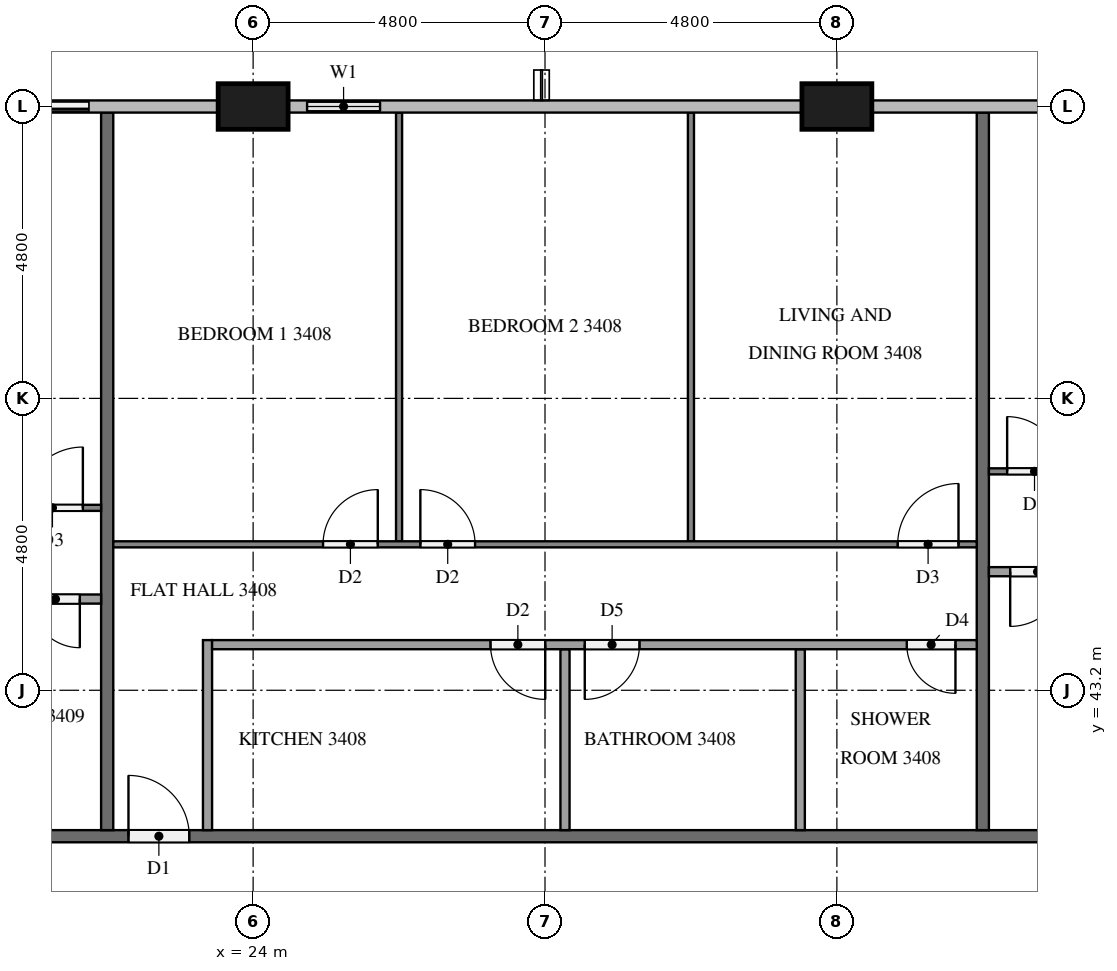
"""IFC4 building model, lengths in metres.
Left out: names, types, materials, properties, quantities, classifications, styles, units other than length and angle.
Written with IfcOpenShell. Run it as: python <this file> out.ifc"""

import sys

from ifc_helpers import new_model, si_unit, direction, frame, frame_2d, origin, origin_2d, place, context, subcontext, project, spatial, rectangle, extrude, element, fill, save


model = new_model("IFC4")
c1 = context("Model", 3, precision=1e-05, world=origin(), true_north=direction((0.0, 1.0)))
c2 = subcontext(c1, "Body", "Model", "MODEL_VIEW")
j1 = project(units=[si_unit("LENGTHUNIT", "METRE"), si_unit("PLANEANGLEUNIT", "RADIAN")], contexts=[c1])
p1 = place(None, origin())
s1 = spatial("IfcSite", under=j1, at=p1, CompositionType="ELEMENT")
p2 = place(p1, origin())
s2 = spatial("IfcBuilding", under=s1, at=p2, CompositionType="ELEMENT")
p3 = place(p2, frame((0.0, 0.0, 133.1)))
s3 = spatial("IfcBuildingStorey", under=s2, at=p3, CompositionType="ELEMENT", Elevation=133.1)
for number, where, z_axis, x_axis in (
    (1, (33.6, 52.8, 0.0), (0.0, 0.0, 1.0), (1.0, 0.0, 0.0)),
    (2, (24.0, 52.8, 0.0), (0.0, 0.0, 1.0), (1.0, 0.0, 0.0)),
):
    element("IfcColumn", number, at=place(p3, frame(where, z_axis=z_axis, x_axis=x_axis)), inside=s3, PredefinedType="COLUMN", context=c2, shape_type="SweptSolid", body=[
        extrude(rectangle(XDim=1.15, YDim=0.75, at=origin_2d()), origin(), (0.0, 0.0, 1.0), 3.2),
    ])
p4 = place(p3, frame((26.4, 52.8, 0.0), z_axis=(0.0, 0.0, 1.0), x_axis=(-1.0, 0.0, 0.0)))
e3 = element("IfcWall", 3, at=p4, inside=s3, PredefinedType="SOLIDWALL", context=c2, shape_type="SweptSolid", body=[
    extrude(rectangle(XDim=1.825, YDim=0.15, at=frame_2d((0.913, 0.0))), origin(), (0.0, 0.0, 1.0), 3.2),
])
p5 = place(p4, frame((0.312, 0.0, 0.9)))
e4 = element("IfcOpeningElement", 4, at=p5, cuts=e3, PredefinedType="OPENING", context=c2, shape_type="SweptSolid", body=[
    extrude(rectangle(XDim=1.2, YDim=1.4, at=frame_2d((0.6, 0.7))), frame((0.0, 0.085, 0.0), z_axis=(0.0, -1.0, 0.0), x_axis=(1.0, 0.0, 0.0)), (0.0, 0.0, 1.0), 0.17),
])
p6 = place(p3, frame((21.6, 52.8, 0.0), z_axis=(0.0, 0.0, 1.0), x_axis=(-1.0, 0.0, 0.0)))
e5 = element("IfcWall", 5, at=p6, inside=s3, PredefinedType="SOLIDWALL", context=c2, shape_type="SweptSolid", body=[
    extrude(rectangle(XDim=2.4, YDim=0.15, at=frame_2d((1.2, 0.0))), origin(), (0.0, 0.0, 1.0), 3.2),
])
p7 = place(p6, frame((0.3, 0.0, 0.0)))
e6 = element("IfcOpeningElement", 6, at=p7, cuts=e5, PredefinedType="OPENING", context=c2, shape_type="SweptSolid", body=[
    extrude(rectangle(XDim=1.8, YDim=2.4, at=frame_2d((0.9, 1.2))), frame((0.0, 0.085, 0.0), z_axis=(0.0, -1.0, 0.0), x_axis=(1.0, 0.0, 0.0)), (0.0, 0.0, 1.0), 0.17),
])
p8 = place(p3, frame((11.9, 40.8, 0.0), z_axis=(0.0, 0.0, 1.0), x_axis=(1.0, 0.0, 0.0)))
e7 = element("IfcWall", 7, at=p8, inside=s3, PredefinedType="PARTITIONING", context=c2, shape_type="SweptSolid", body=[
    extrude(rectangle(XDim=38.6, YDim=0.2, at=frame_2d((19.3, 0.0))), origin(), (0.0, 0.0, 1.0), 3.2),
])
p9 = place(p8, frame((37.15, 0.0, 0.0)))
e8 = element("IfcOpeningElement", 8, at=p9, cuts=e7, PredefinedType="OPENING", context=c2, shape_type="SweptSolid", body=[
    extrude(rectangle(XDim=1.0, YDim=2.1, at=frame_2d((0.5, 1.05))), frame((0.0, 0.11, 0.0), z_axis=(0.0, -1.0, 0.0), x_axis=(1.0, 0.0, 0.0)), (0.0, 0.0, 1.0), 0.22),
])
p10 = place(p8, frame((10.05, 0.0, 0.0)))
e9 = element("IfcOpeningElement", 9, at=p10, cuts=e7, PredefinedType="OPENING", context=c2, shape_type="SweptSolid", body=[
    extrude(rectangle(XDim=1.0, YDim=2.1, at=frame_2d((0.5, 1.05))), frame((0.0, 0.11, 0.0), z_axis=(0.0, -1.0, 0.0), x_axis=(1.0, 0.0, 0.0)), (0.0, 0.0, 1.0), 0.22),
])
p11 = place(p8, frame((0.45, 0.0, 0.0)))
e10 = element("IfcOpeningElement", 10, at=p11, cuts=e7, PredefinedType="OPENING", context=c2, shape_type="SweptSolid", body=[
    extrude(rectangle(XDim=1.0, YDim=2.1, at=frame_2d((0.5, 1.05))), frame((0.0, 0.11, 0.0), z_axis=(0.0, -1.0, 0.0), x_axis=(1.0, 0.0, 0.0)), (0.0, 0.0, 1.0), 0.22),
])
for number, where, z_axis, x_axis in (
    (11, (36.0, 52.7, 0.0), (0.0, 0.0, 1.0), (0.0, -1.0, 0.0)),
    (12, (21.6, 52.7, 0.0), (0.0, 0.0, 1.0), (0.0, -1.0, 0.0)),
):
    element("IfcWall", number, at=place(p3, frame(where, z_axis=z_axis, x_axis=x_axis)), inside=s3, PredefinedType="PARTITIONING", context=c2, shape_type="SweptSolid", body=[
        extrude(rectangle(XDim=11.8, YDim=0.2, at=frame_2d((5.9, 0.0))), origin(), (0.0, 0.0, 1.0), 3.2),
    ])
p12 = place(p3, frame((36.1, 46.8, 0.0), z_axis=(0.0, 0.0, 1.0), x_axis=(1.0, 0.0, 0.0)))
e13 = element("IfcWall", 13, at=p12, inside=s3, PredefinedType="PARTITIONING", context=c2, shape_type="SweptSolid", body=[
    extrude(rectangle(XDim=14.2, YDim=0.1, at=frame_2d((7.1, 0.0))), origin(), (0.0, 0.0, 1.0), 3.2),
])
p13 = place(p12, frame((9.85, 0.0, 0.0)))
e14 = element("IfcOpeningElement", 14, at=p13, cuts=e13, PredefinedType="OPENING", context=c2, shape_type="SweptSolid", body=[
    extrude(rectangle(XDim=0.9, YDim=2.1, at=frame_2d((0.45, 1.05))), frame((0.0, 0.06, 0.0), z_axis=(0.0, -1.0, 0.0), x_axis=(1.0, 0.0, 0.0)), (0.0, 0.0, 1.0), 0.12),
])
p14 = place(p12, frame((8.15, 0.0, 0.0)))
e15 = element("IfcOpeningElement", 15, at=p14, cuts=e13, PredefinedType="OPENING", context=c2, shape_type="SweptSolid", body=[
    extrude(rectangle(XDim=1.0, YDim=2.1, at=frame_2d((0.5, 1.05))), frame((0.0, 0.06, 0.0), z_axis=(0.0, -1.0, 0.0), x_axis=(1.0, 0.0, 0.0)), (0.0, 0.0, 1.0), 0.12),
])
p15 = place(p12, frame((0.3, 0.0, 0.0)))
e16 = element("IfcOpeningElement", 16, at=p15, cuts=e13, PredefinedType="OPENING", context=c2, shape_type="SweptSolid", body=[
    extrude(rectangle(XDim=0.9, YDim=2.1, at=frame_2d((0.45, 1.05))), frame((0.0, 0.06, 0.0), z_axis=(0.0, -1.0, 0.0), x_axis=(1.0, 0.0, 0.0)), (0.0, 0.0, 1.0), 0.12),
])
p16 = place(p3, frame((48.675, 45.15, 0.0), z_axis=(0.0, 0.0, 1.0), x_axis=(-1.0, 0.0, 0.0)))
e17 = element("IfcWall", 17, at=p16, inside=s3, PredefinedType="PARTITIONING", context=c2, shape_type="SweptSolid", body=[
    extrude(rectangle(XDim=12.575, YDim=0.15, at=frame_2d((6.288, 0.0))), origin(), (0.0, 0.0, 1.0), 3.2),
])
p17 = place(p16, frame((2.644, 0.0, 0.0)))
e18 = element("IfcOpeningElement", 18, at=p17, cuts=e17, PredefinedType="OPENING", context=c2, shape_type="SweptSolid", body=[
    extrude(rectangle(XDim=0.9, YDim=2.1, at=frame_2d((0.45, 1.05))), frame((0.0, 0.085, 0.0), z_axis=(0.0, -1.0, 0.0), x_axis=(1.0, 0.0, 0.0)), (0.0, 0.0, 1.0), 0.17),
])
p18 = place(p16, frame((4.194, 0.0, 0.0)))
e19 = element("IfcOpeningElement", 19, at=p18, cuts=e17, PredefinedType="OPENING", context=c2, shape_type="SweptSolid", body=[
    extrude(rectangle(XDim=0.8, YDim=2.1, at=frame_2d((0.4, 1.05))), frame((0.0, 0.085, 0.0), z_axis=(0.0, -1.0, 0.0), x_axis=(1.0, 0.0, 0.0)), (0.0, 0.0, 1.0), 0.17),
])
p19 = place(p16, frame((11.325, 0.0, 0.0)))
e20 = element("IfcOpeningElement", 20, at=p19, cuts=e17, PredefinedType="OPENING", context=c2, shape_type="SweptSolid", body=[
    extrude(rectangle(XDim=0.9, YDim=2.1, at=frame_2d((0.45, 1.05))), frame((0.0, 0.085, 0.0), z_axis=(0.0, -1.0, 0.0), x_axis=(1.0, 0.0, 0.0)), (0.0, 0.0, 1.0), 0.17),
])
for number, where, z_axis, x_axis in (
    (21, (26.4, 45.65, 0.0), (0.0, 0.0, 1.0), (0.0, 1.0, 0.0)),
    (22, (31.2, 45.65, 0.0), (0.0, 0.0, 1.0), (0.0, 1.0, 0.0)),
):
    element("IfcWall", number, at=place(p3, frame(where, z_axis=z_axis, x_axis=x_axis)), inside=s3, PredefinedType="PARTITIONING", context=c2, shape_type="SweptSolid", body=[
        extrude(rectangle(XDim=7.05, YDim=0.1, at=frame_2d((3.525, 0.0))), origin(), (0.0, 0.0, 1.0), 3.2),
    ])
p20 = place(p3, frame((21.7, 45.6, 0.0), z_axis=(0.0, 0.0, 1.0), x_axis=(1.0, 0.0, 0.0)))
e23 = element("IfcWall", 23, at=p20, inside=s3, PredefinedType="PARTITIONING", context=c2, shape_type="SweptSolid", body=[
    extrude(rectangle(XDim=14.2, YDim=0.1, at=frame_2d((7.1, 0.0))), origin(), (0.0, 0.0, 1.0), 3.2),
])
p21 = place(p20, frame((3.45, 0.0, 0.0)))
e24 = element("IfcOpeningElement", 24, at=p21, cuts=e23, PredefinedType="OPENING", context=c2, shape_type="SweptSolid", body=[
    extrude(rectangle(XDim=0.9, YDim=2.1, at=frame_2d((0.45, 1.05))), frame((0.0, 0.06, 0.0), z_axis=(0.0, -1.0, 0.0), x_axis=(1.0, 0.0, 0.0)), (0.0, 0.0, 1.0), 0.12),
])
p22 = place(p20, frame((5.05, 0.0, 0.0)))
e25 = element("IfcOpeningElement", 25, at=p22, cuts=e23, PredefinedType="OPENING", context=c2, shape_type="SweptSolid", body=[
    extrude(rectangle(XDim=0.9, YDim=2.1, at=frame_2d((0.45, 1.05))), frame((0.0, 0.06, 0.0), z_axis=(0.0, -1.0, 0.0), x_axis=(1.0, 0.0, 0.0)), (0.0, 0.0, 1.0), 0.12),
])
p23 = place(p20, frame((12.9, 0.0, 0.0)))
e26 = element("IfcOpeningElement", 26, at=p23, cuts=e23, PredefinedType="OPENING", context=c2, shape_type="SweptSolid", body=[
    extrude(rectangle(XDim=1.0, YDim=2.1, at=frame_2d((0.5, 1.05))), frame((0.0, 0.06, 0.0), z_axis=(0.0, -1.0, 0.0), x_axis=(1.0, 0.0, 0.0)), (0.0, 0.0, 1.0), 0.12),
])
for number, where, z_axis, x_axis in (
    (27, (29.129, 40.9, 0.0), (0.0, 0.0, 1.0), (0.0, 1.0, 0.0)),
    (28, (32.998, 40.9, 0.0), (0.0, 0.0, 1.0), (0.0, 1.0, 0.0)),
):
    element("IfcWall", number, at=place(p3, frame(where, z_axis=z_axis, x_axis=x_axis)), inside=s3, PredefinedType="PARTITIONING", context=c2, shape_type="SweptSolid", body=[
        extrude(rectangle(XDim=2.975, YDim=0.15, at=frame_2d((1.488, 0.0))), origin(), (0.0, 0.0, 1.0), 3.2),
    ])
p24 = place(p3, frame((23.25, 40.9, 0.0), z_axis=(0.0, 0.0, 1.0), x_axis=(0.0, 1.0, 0.0)))
e29 = element("IfcWall", 29, at=p24, inside=s3, PredefinedType="PARTITIONING", context=c2, shape_type="SweptSolid", body=[
    extrude(rectangle(XDim=3.125, YDim=0.15, at=frame_2d((1.562, 0.0))), origin(), (0.0, 0.0, 1.0), 3.2),
])
p25 = place(p3, frame((35.9, 43.95, 0.0), z_axis=(0.0, 0.0, 1.0), x_axis=(-1.0, 0.0, 0.0)))
e30 = element("IfcWall", 30, at=p25, inside=s3, PredefinedType="PARTITIONING", context=c2, shape_type="SweptSolid", body=[
    extrude(rectangle(XDim=12.575, YDim=0.15, at=frame_2d((6.288, 0.0))), origin(), (0.0, 0.0, 1.0), 3.2),
])
p26 = place(p25, frame((7.096, 0.0, 0.0)))
e31 = element("IfcOpeningElement", 31, at=p26, cuts=e30, PredefinedType="OPENING", context=c2, shape_type="SweptSolid", body=[
    extrude(rectangle(XDim=0.9, YDim=2.1, at=frame_2d((0.45, 1.05))), frame((0.0, 0.085, 0.0), z_axis=(0.0, -1.0, 0.0), x_axis=(1.0, 0.0, 0.0)), (0.0, 0.0, 1.0), 0.17),
])
p27 = place(p25, frame((5.546, 0.0, 0.0)))
e32 = element("IfcOpeningElement", 32, at=p27, cuts=e30, PredefinedType="OPENING", context=c2, shape_type="SweptSolid", body=[
    extrude(rectangle(XDim=0.9, YDim=2.1, at=frame_2d((0.45, 1.05))), frame((0.0, 0.085, 0.0), z_axis=(0.0, -1.0, 0.0), x_axis=(1.0, 0.0, 0.0)), (0.0, 0.0, 1.0), 0.17),
])
p28 = place(p25, frame((0.35, 0.0, 0.0)))
e33 = element("IfcOpeningElement", 33, at=p28, cuts=e30, PredefinedType="OPENING", context=c2, shape_type="SweptSolid", body=[
    extrude(rectangle(XDim=0.8, YDim=2.1, at=frame_2d((0.4, 1.05))), frame((0.0, 0.085, 0.0), z_axis=(0.0, -1.0, 0.0), x_axis=(1.0, 0.0, 0.0)), (0.0, 0.0, 1.0), 0.17),
])
p29 = place(p3, frame((12.1, 46.2, 0.0), z_axis=(0.0, 0.0, 1.0), x_axis=(1.0, 0.0, 0.0)))
e34 = element("IfcWall", 34, at=p29, inside=s3, PredefinedType="PARTITIONING", context=c2, shape_type="SweptSolid", body=[
    extrude(rectangle(XDim=9.4, YDim=0.1, at=frame_2d((4.7, 0.0))), origin(), (0.0, 0.0, 1.0), 3.2),
])
p30 = place(p29, frame((0.3, 0.0, 0.0)))
e35 = element("IfcOpeningElement", 35, at=p30, cuts=e34, PredefinedType="OPENING", context=c2, shape_type="SweptSolid", body=[
    extrude(rectangle(XDim=0.9, YDim=2.1, at=frame_2d((0.45, 1.05))), frame((0.0, 0.06, 0.0), z_axis=(0.0, -1.0, 0.0), x_axis=(1.0, 0.0, 0.0)), (0.0, 0.0, 1.0), 0.12),
])
p31 = place(p29, frame((8.1, 0.0, 0.0)))
e36 = element("IfcOpeningElement", 36, at=p31, cuts=e34, PredefinedType="OPENING", context=c2, shape_type="SweptSolid", body=[
    extrude(rectangle(XDim=1.0, YDim=2.1, at=frame_2d((0.5, 1.05))), frame((0.0, 0.06, 0.0), z_axis=(0.0, -1.0, 0.0), x_axis=(1.0, 0.0, 0.0)), (0.0, 0.0, 1.0), 0.12),
])
p32 = place(p3, frame((21.5, 44.7, 0.0), z_axis=(0.0, 0.0, 1.0), x_axis=(-1.0, 0.0, 0.0)))
e37 = element("IfcWall", 37, at=p32, inside=s3, PredefinedType="PARTITIONING", context=c2, shape_type="SweptSolid", body=[
    extrude(rectangle(XDim=7.775, YDim=0.15, at=frame_2d((3.887, 0.0))), origin(), (0.0, 0.0, 1.0), 3.2),
])
p33 = place(p32, frame((6.575, 0.0, 0.0)))
e38 = element("IfcOpeningElement", 38, at=p33, cuts=e37, PredefinedType="OPENING", context=c2, shape_type="SweptSolid", body=[
    extrude(rectangle(XDim=0.9, YDim=2.1, at=frame_2d((0.45, 1.05))), frame((0.0, 0.085, 0.0), z_axis=(0.0, -1.0, 0.0), x_axis=(1.0, 0.0, 0.0)), (0.0, 0.0, 1.0), 0.17),
])
p34 = place(p32, frame((0.35, 0.0, 0.0)))
e39 = element("IfcOpeningElement", 39, at=p34, cuts=e37, PredefinedType="OPENING", context=c2, shape_type="SweptSolid", body=[
    extrude(rectangle(XDim=0.8, YDim=2.1, at=frame_2d((0.4, 1.05))), frame((0.0, 0.085, 0.0), z_axis=(0.0, -1.0, 0.0), x_axis=(1.0, 0.0, 0.0)), (0.0, 0.0, 1.0), 0.17),
])
p35 = place(p5, origin())
e40 = element("IfcWindow", 40, at=p35, inside=s3, PartitioningType="SINGLE_PANEL", PredefinedType="WINDOW", context=c2, shape_type="SweptSolid", body=[
    extrude(rectangle(XDim=1.2, YDim=1.4, at=frame_2d((0.6, 0.7))), frame((0.0, 0.03, 0.0), z_axis=(0.0, -1.0, 0.0), x_axis=(1.0, 0.0, 0.0)), (0.0, 0.0, 1.0), 0.06),
])
fill(e4, e40)
p36 = place(p7, origin())
e41 = element("IfcDoor", 41, at=p36, inside=s3, OperationType="SLIDING_TO_RIGHT", PredefinedType="DOOR", context=c2, shape_type="SweptSolid", body=[
    extrude(rectangle(XDim=1.8, YDim=2.4, at=frame_2d((0.9, 1.2))), frame((0.0, 0.025, 0.0), z_axis=(0.0, -1.0, 0.0), x_axis=(1.0, 0.0, 0.0)), (0.0, 0.0, 1.0), 0.05),
])
fill(e6, e41)
p37 = place(p10, origin())
e42 = element("IfcDoor", 42, at=p37, inside=s3, OperationType="SINGLE_SWING_LEFT", PredefinedType="DOOR", context=c2, shape_type="SweptSolid", body=[
    extrude(rectangle(XDim=1.0, YDim=2.1, at=frame_2d((0.5, 1.05))), frame((0.0, 0.025, 0.0), z_axis=(0.0, -1.0, 0.0), x_axis=(1.0, 0.0, 0.0)), (0.0, 0.0, 1.0), 0.05),
])
fill(e9, e42)
p38 = place(p15, origin())
e43 = element("IfcDoor", 43, at=p38, inside=s3, OperationType="SINGLE_SWING_LEFT", PredefinedType="DOOR", context=c2, shape_type="SweptSolid", body=[
    extrude(rectangle(XDim=0.9, YDim=2.1, at=frame_2d((0.45, 1.05))), frame((0.0, 0.025, 0.0), z_axis=(0.0, -1.0, 0.0), x_axis=(1.0, 0.0, 0.0)), (0.0, 0.0, 1.0), 0.05),
])
fill(e16, e43)
p39 = place(p19, origin())
e44 = element("IfcDoor", 44, at=p39, inside=s3, OperationType="SINGLE_SWING_RIGHT", PredefinedType="DOOR", context=c2, shape_type="SweptSolid", body=[
    extrude(rectangle(XDim=0.9, YDim=2.1, at=frame_2d((0.45, 1.05))), frame((0.0, 0.025, 0.0), z_axis=(0.0, -1.0, 0.0), x_axis=(1.0, 0.0, 0.0)), (0.0, 0.0, 1.0), 0.05),
])
fill(e20, e44)
p40 = place(p21, origin())
e45 = element("IfcDoor", 45, at=p40, inside=s3, OperationType="SINGLE_SWING_RIGHT", PredefinedType="DOOR", context=c2, shape_type="SweptSolid", body=[
    extrude(rectangle(XDim=0.9, YDim=2.1, at=frame_2d((0.45, 1.05))), frame((0.0, 0.025, 0.0), z_axis=(0.0, -1.0, 0.0), x_axis=(1.0, 0.0, 0.0)), (0.0, 0.0, 1.0), 0.05),
])
fill(e24, e45)
p41 = place(p22, origin())
e46 = element("IfcDoor", 46, at=p41, inside=s3, OperationType="SINGLE_SWING_LEFT", PredefinedType="DOOR", context=c2, shape_type="SweptSolid", body=[
    extrude(rectangle(XDim=0.9, YDim=2.1, at=frame_2d((0.45, 1.05))), frame((0.0, 0.025, 0.0), z_axis=(0.0, -1.0, 0.0), x_axis=(1.0, 0.0, 0.0)), (0.0, 0.0, 1.0), 0.05),
])
fill(e25, e46)
p42 = place(p23, origin())
e47 = element("IfcDoor", 47, at=p42, inside=s3, OperationType="SINGLE_SWING_RIGHT", PredefinedType="DOOR", context=c2, shape_type="SweptSolid", body=[
    extrude(rectangle(XDim=1.0, YDim=2.1, at=frame_2d((0.5, 1.05))), frame((0.0, 0.025, 0.0), z_axis=(0.0, -1.0, 0.0), x_axis=(1.0, 0.0, 0.0)), (0.0, 0.0, 1.0), 0.05),
])
fill(e26, e47)
p43 = place(p26, origin())
e48 = element("IfcDoor", 48, at=p43, inside=s3, OperationType="SINGLE_SWING_LEFT", PredefinedType="DOOR", context=c2, shape_type="SweptSolid", body=[
    extrude(rectangle(XDim=0.9, YDim=2.1, at=frame_2d((0.45, 1.05))), frame((0.0, 0.025, 0.0), z_axis=(0.0, -1.0, 0.0), x_axis=(1.0, 0.0, 0.0)), (0.0, 0.0, 1.0), 0.05),
])
fill(e31, e48)
p44 = place(p27, origin())
e49 = element("IfcDoor", 49, at=p44, inside=s3, OperationType="SINGLE_SWING_RIGHT", PredefinedType="DOOR", context=c2, shape_type="SweptSolid", body=[
    extrude(rectangle(XDim=0.9, YDim=2.1, at=frame_2d((0.45, 1.05))), frame((0.0, 0.025, 0.0), z_axis=(0.0, -1.0, 0.0), x_axis=(1.0, 0.0, 0.0)), (0.0, 0.0, 1.0), 0.05),
])
fill(e32, e49)
p45 = place(p28, origin())
e50 = element("IfcDoor", 50, at=p45, inside=s3, OperationType="SINGLE_SWING_LEFT", PredefinedType="DOOR", context=c2, shape_type="SweptSolid", body=[
    extrude(rectangle(XDim=0.8, YDim=2.1, at=frame_2d((0.4, 1.05))), frame((0.0, 0.025, 0.0), z_axis=(0.0, -1.0, 0.0), x_axis=(1.0, 0.0, 0.0)), (0.0, 0.0, 1.0), 0.05),
])
fill(e33, e50)
p46 = place(p31, origin())
e51 = element("IfcDoor", 51, at=p46, inside=s3, OperationType="SINGLE_SWING_RIGHT", PredefinedType="DOOR", context=c2, shape_type="SweptSolid", body=[
    extrude(rectangle(XDim=1.0, YDim=2.1, at=frame_2d((0.5, 1.05))), frame((0.0, 0.025, 0.0), z_axis=(0.0, -1.0, 0.0), x_axis=(1.0, 0.0, 0.0)), (0.0, 0.0, 1.0), 0.05),
])
fill(e36, e51)
p47 = place(p34, origin())
e52 = element("IfcDoor", 52, at=p47, inside=s3, OperationType="SINGLE_SWING_LEFT", PredefinedType="DOOR", context=c2, shape_type="SweptSolid", body=[
    extrude(rectangle(XDim=0.8, YDim=2.1, at=frame_2d((0.4, 1.05))), frame((0.0, 0.025, 0.0), z_axis=(0.0, -1.0, 0.0), x_axis=(1.0, 0.0, 0.0)), (0.0, 0.0, 1.0), 0.05),
])
fill(e39, e52)
save(model, sys.argv[1])
